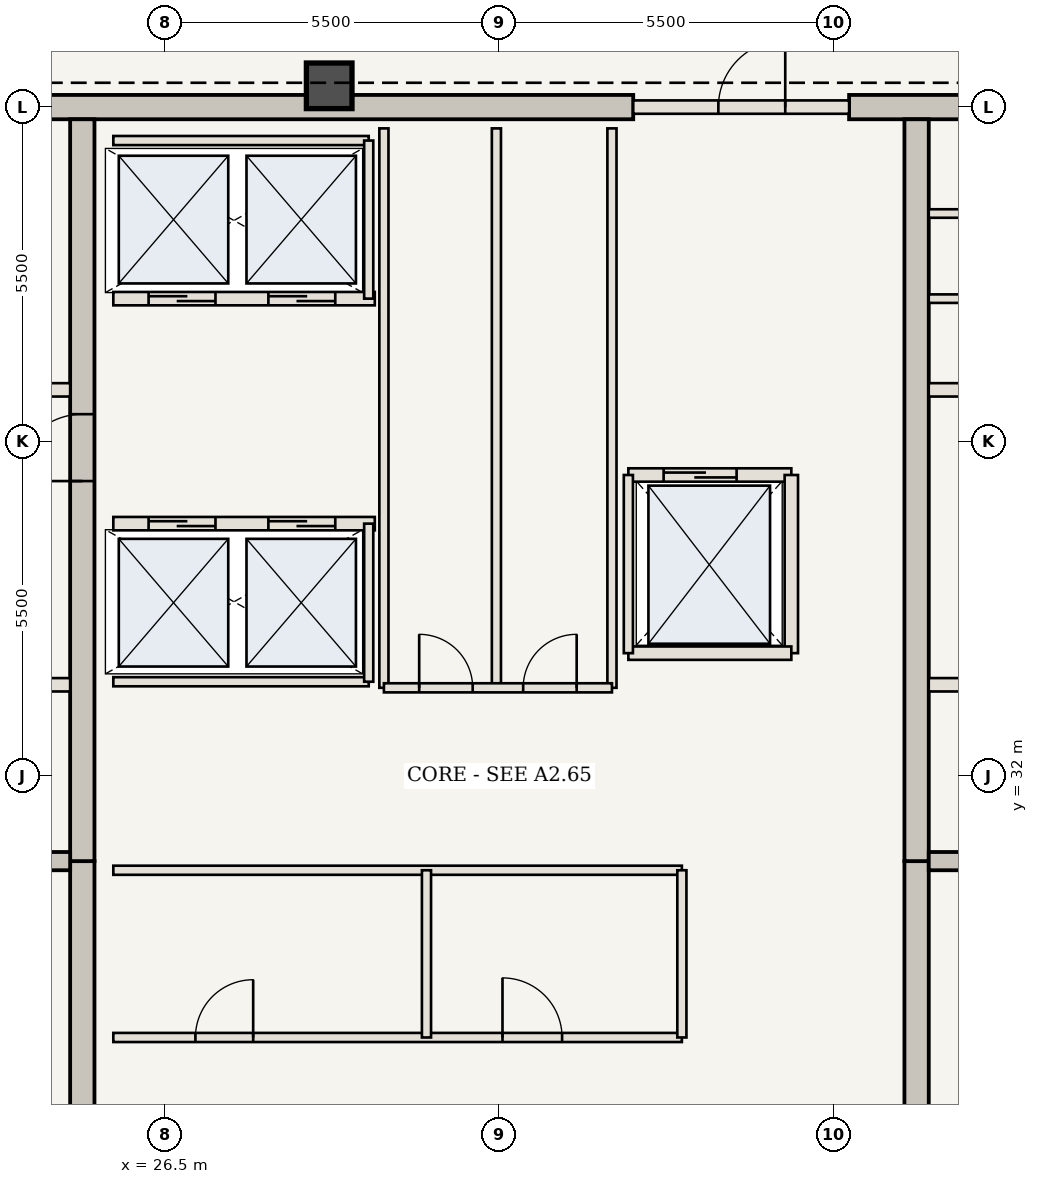
"""IFC4 building model, lengths in metres.
Left out: names, types, materials, properties, quantities, classifications, styles, units other than length and angle.
Written with IfcOpenShell. Run it as: python <this file> out.ifc"""

import sys

from ifc_helpers import new_model, si_unit, direction, frame, frame_2d, origin, origin_2d, place, context, subcontext, project, spatial, rectangle, extrude, element, fill, save


model = new_model("IFC4")
c1 = context("Model", 3, precision=1e-05, world=origin(), true_north=direction((0.0, 1.0)))
c2 = subcontext(c1, "Body", "Model", "MODEL_VIEW")
j1 = project(units=[si_unit("LENGTHUNIT", "METRE"), si_unit("PLANEANGLEUNIT", "RADIAN")], contexts=[c1])
p1 = place(None, origin())
s1 = spatial("IfcSite", under=j1, at=p1, CompositionType="ELEMENT")
p2 = place(p1, origin())
s2 = spatial("IfcBuilding", under=s1, at=p2, CompositionType="ELEMENT")
p3 = place(p2, frame((0.0, 0.0, 304.5)))
s3 = spatial("IfcBuildingStorey", under=s2, at=p3, CompositionType="ELEMENT", Elevation=304.5)
p4 = place(p3, frame((21.41, 43.0, 0.0), z_axis=(0.0, 0.0, 1.0), x_axis=(1.0, 0.0, 0.0)))
e1 = element("IfcWall", 1, at=p4, inside=s3, PredefinedType="SHEAR", context=c2, shape_type="SweptSolid", body=[
    extrude(rectangle(XDim=12.79, YDim=0.4, at=frame_2d((6.395, 0.0))), origin(), (0.0, 0.0, 1.0), 3.85),
])
p5 = place(p3, frame((37.75, 43.0, 0.0), z_axis=(0.0, 0.0, 1.0), x_axis=(1.0, 0.0, 0.0)))
e2 = element("IfcWall", 2, at=p5, inside=s3, PredefinedType="SHEAR", context=c2, shape_type="SweptSolid", body=[
    extrude(rectangle(XDim=4.84, YDim=0.4, at=frame_2d((2.42, 0.0))), origin(), (0.0, 0.0, 1.0), 3.85),
])
p6 = place(p3, frame((25.14, 21.15, 0.0), z_axis=(0.0, 0.0, 1.0), x_axis=(0.0, 1.0, 0.0)))
e3 = element("IfcWall", 3, at=p6, inside=s3, PredefinedType="SHEAR", context=c2, shape_type="SweptSolid", body=[
    extrude(rectangle(XDim=9.45, YDim=0.4, at=frame_2d((4.725, 0.0))), origin(), (0.0, 0.0, 1.0), 3.85),
])
p7 = place(p3, frame((25.14, 30.6, 0.0), z_axis=(0.0, 0.0, 1.0), x_axis=(0.0, 1.0, 0.0)))
e4 = element("IfcWall", 4, at=p7, inside=s3, PredefinedType="SHEAR", context=c2, shape_type="SweptSolid", body=[
    extrude(rectangle(XDim=12.2, YDim=0.4, at=frame_2d((6.1, 0.0))), origin(), (0.0, 0.0, 1.0), 3.85),
])
p8 = place(p7, frame((6.25, 0.0, 0.0)))
e5 = element("IfcOpeningElement", 5, at=p8, cuts=e4, PredefinedType="OPENING", context=c2, shape_type="SweptSolid", body=[
    extrude(rectangle(XDim=1.1, YDim=2.15, at=frame_2d((0.55, 1.075))), frame((0.0, 0.21, 0.0), z_axis=(0.0, -1.0, 0.0), x_axis=(1.0, 0.0, 0.0)), (0.0, 0.0, 1.0), 0.42),
])
p9 = place(p3, frame((38.86, 21.15, 0.0), z_axis=(0.0, 0.0, 1.0), x_axis=(0.0, 1.0, 0.0)))
e6 = element("IfcWall", 6, at=p9, inside=s3, PredefinedType="SHEAR", context=c2, shape_type="SweptSolid", body=[
    extrude(rectangle(XDim=9.45, YDim=0.4, at=frame_2d((4.725, 0.0))), origin(), (0.0, 0.0, 1.0), 3.85),
])
p10 = place(p3, frame((38.86, 30.6, 0.0), z_axis=(0.0, 0.0, 1.0), x_axis=(0.0, 1.0, 0.0)))
e7 = element("IfcWall", 7, at=p10, inside=s3, PredefinedType="SHEAR", context=c2, shape_type="SweptSolid", body=[
    extrude(rectangle(XDim=12.2, YDim=0.4, at=frame_2d((6.1, 0.0))), origin(), (0.0, 0.0, 1.0), 3.85),
])
p11 = place(p3, frame((29.2, 43.35, 0.0), z_axis=(0.0, 0.0, 1.0), x_axis=(1.0, 0.0, 0.0)))
e8 = element("IfcColumn", 8, at=p11, inside=s3, PredefinedType="COLUMN", context=c2, shape_type="SweptSolid", body=[
    extrude(rectangle(XDim=0.75, YDim=0.75, at=origin_2d()), origin(), (0.0, 0.0, 1.0), 3.85),
])
for number, where, z_axis, x_axis in (
    (9, (21.41, 30.6, 0.0), (0.0, 0.0, 1.0), (1.0, 0.0, 0.0)),
    (10, (39.06, 30.6, 0.0), (0.0, 0.0, 1.0), (1.0, 0.0, 0.0)),
):
    element("IfcWall", number, at=place(p3, frame(where, z_axis=z_axis, x_axis=x_axis)), inside=s3, PredefinedType="SHEAR", context=c2, shape_type="SweptSolid", body=[
        extrude(rectangle(XDim=3.53, YDim=0.3, at=frame_2d((1.765, 0.0))), origin(), (0.0, 0.0, 1.0), 3.63),
    ])
p12 = place(p3, frame((21.41, 33.5, 0.0), z_axis=(0.0, 0.0, 1.0), x_axis=(1.0, 0.0, 0.0)))
e11 = element("IfcWall", 11, at=p12, inside=s3, PredefinedType="STANDARD", context=c2, shape_type="SweptSolid", body=[
    extrude(rectangle(XDim=3.53, YDim=0.22, at=frame_2d((1.765, 0.0))), origin(), (0.0, 0.0, 1.0), 3.63),
])
p13 = place(p12, frame((0.75, 0.0, 0.0)))
e12 = element("IfcOpeningElement", 12, at=p13, cuts=e11, PredefinedType="OPENING", context=c2, shape_type="SweptSolid", body=[
    extrude(rectangle(XDim=1.2, YDim=2.2, at=frame_2d((0.6, 1.1))), frame((0.0, 0.12, 0.0), z_axis=(0.0, -1.0, 0.0), x_axis=(1.0, 0.0, 0.0)), (0.0, 0.0, 1.0), 0.24),
])
p14 = place(p3, frame((39.06, 33.5, 0.0), z_axis=(0.0, 0.0, 1.0), x_axis=(1.0, 0.0, 0.0)))
e13 = element("IfcWall", 13, at=p14, inside=s3, PredefinedType="STANDARD", context=c2, shape_type="SweptSolid", body=[
    extrude(rectangle(XDim=3.53, YDim=0.22, at=frame_2d((1.765, 0.0))), origin(), (0.0, 0.0, 1.0), 3.63),
])
p15 = place(p14, frame((1.55, 0.0, 0.0)))
e14 = element("IfcOpeningElement", 14, at=p15, cuts=e13, PredefinedType="OPENING", context=c2, shape_type="SweptSolid", body=[
    extrude(rectangle(XDim=1.2, YDim=2.2, at=frame_2d((0.6, 1.1))), frame((0.0, 0.12, 0.0), z_axis=(0.0, -1.0, 0.0), x_axis=(1.0, 0.0, 0.0)), (0.0, 0.0, 1.0), 0.24),
])
for number, where, z_axis, x_axis in (
    (15, (21.41, 38.35, 0.0), (0.0, 0.0, 1.0), (1.0, 0.0, 0.0)),
    (16, (39.06, 38.35, 0.0), (0.0, 0.0, 1.0), (1.0, 0.0, 0.0)),
):
    element("IfcWall", number, at=place(p3, frame(where, z_axis=z_axis, x_axis=x_axis)), inside=s3, PredefinedType="STANDARD", context=c2, shape_type="SweptSolid", body=[
        extrude(rectangle(XDim=3.53, YDim=0.22, at=frame_2d((1.765, 0.0))), origin(), (0.0, 0.0, 1.0), 3.63),
    ])
for number, where, z_axis, x_axis in (
    (17, (39.06, 39.85, 0.0), (0.0, 0.0, 1.0), (1.0, 0.0, 0.0)),
    (18, (39.06, 41.25, 0.0), (0.0, 0.0, 1.0), (1.0, 0.0, 0.0)),
):
    element("IfcWall", number, at=place(p3, frame(where, z_axis=z_axis, x_axis=x_axis)), inside=s3, PredefinedType="STANDARD", context=c2, shape_type="SweptSolid", body=[
        extrude(rectangle(XDim=3.53, YDim=0.14, at=frame_2d((1.765, 0.0))), origin(), (0.0, 0.0, 1.0), 3.63),
    ])
p16 = place(p3, frame((25.65, 27.7, 0.0), z_axis=(0.0, 0.0, 1.0), x_axis=(1.0, 0.0, 0.0)))
e19 = element("IfcWall", 19, at=p16, inside=s3, PredefinedType="STANDARD", context=c2, shape_type="SweptSolid", body=[
    extrude(rectangle(XDim=9.35, YDim=0.15, at=frame_2d((4.675, 0.0))), origin(), (0.0, 0.0, 1.0), 3.63),
])
p17 = place(p16, frame((1.35, 0.0, 0.0)))
e20 = element("IfcOpeningElement", 20, at=p17, cuts=e19, PredefinedType="OPENING", context=c2, shape_type="SweptSolid", body=[
    extrude(rectangle(XDim=0.95, YDim=2.15, at=frame_2d((0.475, 1.075))), frame((0.0, 0.085, 0.0), z_axis=(0.0, -1.0, 0.0), x_axis=(1.0, 0.0, 0.0)), (0.0, 0.0, 1.0), 0.17),
])
p18 = place(p16, frame((6.4, 0.0, 0.0)))
e21 = element("IfcOpeningElement", 21, at=p18, cuts=e19, PredefinedType="OPENING", context=c2, shape_type="SweptSolid", body=[
    extrude(rectangle(XDim=0.98, YDim=2.2, at=frame_2d((0.49, 1.1))), frame((0.0, 0.085, 0.0), z_axis=(0.0, -1.0, 0.0), x_axis=(1.0, 0.0, 0.0)), (0.0, 0.0, 1.0), 0.17),
])
p19 = place(p3, frame((25.65, 30.45, 0.0), z_axis=(0.0, 0.0, 1.0), x_axis=(1.0, 0.0, 0.0)))
e22 = element("IfcWall", 22, at=p19, inside=s3, PredefinedType="STANDARD", context=c2, shape_type="SweptSolid", body=[
    extrude(rectangle(XDim=9.35, YDim=0.15, at=frame_2d((4.675, 0.0))), origin(), (0.0, 0.0, 1.0), 3.63),
])
for number, where, z_axis, x_axis in (
    (23, (30.8, 27.7, 0.0), (0.0, 0.0, 1.0), (0.0, 1.0, 0.0)),
    (24, (35.0, 27.7, 0.0), (0.0, 0.0, 1.0), (0.0, 1.0, 0.0)),
):
    element("IfcWall", number, at=place(p3, frame(where, z_axis=z_axis, x_axis=x_axis)), inside=s3, PredefinedType="STANDARD", context=c2, shape_type="SweptSolid", body=[
        extrude(rectangle(XDim=2.75, YDim=0.15, at=frame_2d((1.375, 0.0))), origin(), (0.0, 0.0, 1.0), 3.63),
    ])
p20 = place(p3, frame((25.65, 36.15, 0.0), z_axis=(0.0, 0.0, 1.0), x_axis=(1.0, 0.0, 0.0)))
e25 = element("IfcWall", 25, at=p20, inside=s3, PredefinedType="STANDARD", context=c2, shape_type="SweptSolid", body=[
    extrude(rectangle(XDim=4.3, YDim=0.22, at=frame_2d((2.15, 0.0))), origin(), (0.0, 0.0, 1.0), 3.63),
])
p21 = place(p20, frame((0.58, 0.0, 0.0)))
e26 = element("IfcOpeningElement", 26, at=p21, cuts=e25, PredefinedType="OPENING", context=c2, shape_type="SweptSolid", body=[
    extrude(rectangle(XDim=1.1, YDim=2.15, at=frame_2d((0.55, 1.075))), frame((0.0, 0.12, 0.0), z_axis=(0.0, -1.0, 0.0), x_axis=(1.0, 0.0, 0.0)), (0.0, 0.0, 1.0), 0.24),
])
p22 = place(p20, frame((2.55, 0.0, 0.0)))
e27 = element("IfcOpeningElement", 27, at=p22, cuts=e25, PredefinedType="OPENING", context=c2, shape_type="SweptSolid", body=[
    extrude(rectangle(XDim=1.1, YDim=2.15, at=frame_2d((0.55, 1.075))), frame((0.0, 0.12, 0.0), z_axis=(0.0, -1.0, 0.0), x_axis=(1.0, 0.0, 0.0)), (0.0, 0.0, 1.0), 0.24),
])
p23 = place(p3, frame((25.65, 33.55, 0.0), z_axis=(0.0, 0.0, 1.0), x_axis=(1.0, 0.0, 0.0)))
e28 = element("IfcWall", 28, at=p23, inside=s3, PredefinedType="STANDARD", context=c2, shape_type="SweptSolid", body=[
    extrude(rectangle(XDim=4.2, YDim=0.15, at=frame_2d((2.1, 0.0))), origin(), (0.0, 0.0, 1.0), 3.63),
])
p24 = place(p3, frame((29.85, 33.55, 0.0), z_axis=(0.0, 0.0, 1.0), x_axis=(0.0, 1.0, 0.0)))
e29 = element("IfcWall", 29, at=p24, inside=s3, PredefinedType="STANDARD", context=c2, shape_type="SweptSolid", body=[
    extrude(rectangle(XDim=2.6, YDim=0.15, at=frame_2d((1.3, 0.0))), origin(), (0.0, 0.0, 1.0), 3.63),
])
p25 = place(p3, frame((25.65, 39.85, 0.0), z_axis=(0.0, 0.0, 1.0), x_axis=(1.0, 0.0, 0.0)))
e30 = element("IfcWall", 30, at=p25, inside=s3, PredefinedType="STANDARD", context=c2, shape_type="SweptSolid", body=[
    extrude(rectangle(XDim=4.3, YDim=0.22, at=frame_2d((2.15, 0.0))), origin(), (0.0, 0.0, 1.0), 3.63),
])
p26 = place(p25, frame((0.58, 0.0, 0.0)))
e31 = element("IfcOpeningElement", 31, at=p26, cuts=e30, PredefinedType="OPENING", context=c2, shape_type="SweptSolid", body=[
    extrude(rectangle(XDim=1.1, YDim=2.15, at=frame_2d((0.55, 1.075))), frame((0.0, 0.12, 0.0), z_axis=(0.0, -1.0, 0.0), x_axis=(1.0, 0.0, 0.0)), (0.0, 0.0, 1.0), 0.24),
])
p27 = place(p25, frame((2.55, 0.0, 0.0)))
e32 = element("IfcOpeningElement", 32, at=p27, cuts=e30, PredefinedType="OPENING", context=c2, shape_type="SweptSolid", body=[
    extrude(rectangle(XDim=1.1, YDim=2.15, at=frame_2d((0.55, 1.075))), frame((0.0, 0.12, 0.0), z_axis=(0.0, -1.0, 0.0), x_axis=(1.0, 0.0, 0.0)), (0.0, 0.0, 1.0), 0.24),
])
p28 = place(p3, frame((25.65, 42.45, 0.0), z_axis=(0.0, 0.0, 1.0), x_axis=(1.0, 0.0, 0.0)))
e33 = element("IfcWall", 33, at=p28, inside=s3, PredefinedType="STANDARD", context=c2, shape_type="SweptSolid", body=[
    extrude(rectangle(XDim=4.2, YDim=0.15, at=frame_2d((2.1, 0.0))), origin(), (0.0, 0.0, 1.0), 3.63),
])
p29 = place(p3, frame((29.85, 39.85, 0.0), z_axis=(0.0, 0.0, 1.0), x_axis=(0.0, 1.0, 0.0)))
e34 = element("IfcWall", 34, at=p29, inside=s3, PredefinedType="STANDARD", context=c2, shape_type="SweptSolid", body=[
    extrude(rectangle(XDim=2.6, YDim=0.15, at=frame_2d((1.3, 0.0))), origin(), (0.0, 0.0, 1.0), 3.63),
])
for number, where, z_axis, x_axis in (
    (35, (30.1, 33.45, 0.0), (0.0, 0.0, 1.0), (0.0, 1.0, 0.0)),
    (36, (31.95, 33.45, 0.0), (0.0, 0.0, 1.0), (0.0, 1.0, 0.0)),
    (37, (33.85, 33.45, 0.0), (0.0, 0.0, 1.0), (0.0, 1.0, 0.0)),
):
    element("IfcWall", number, at=place(p3, frame(where, z_axis=z_axis, x_axis=x_axis)), inside=s3, PredefinedType="STANDARD", context=c2, shape_type="SweptSolid", body=[
        extrude(rectangle(XDim=9.2, YDim=0.15, at=frame_2d((4.6, 0.0))), origin(), (0.0, 0.0, 1.0), 3.63),
    ])
p30 = place(p3, frame((30.1, 33.45, 0.0), z_axis=(0.0, 0.0, 1.0), x_axis=(1.0, 0.0, 0.0)))
e38 = element("IfcWall", 38, at=p30, inside=s3, PredefinedType="STANDARD", context=c2, shape_type="SweptSolid", body=[
    extrude(rectangle(XDim=3.75, YDim=0.15, at=frame_2d((1.875, 0.0))), origin(), (0.0, 0.0, 1.0), 3.63),
])
p31 = place(p30, frame((0.58, 0.0, 0.0)))
e39 = element("IfcOpeningElement", 39, at=p31, cuts=e38, PredefinedType="OPENING", context=c2, shape_type="SweptSolid", body=[
    extrude(rectangle(XDim=0.88, YDim=2.1, at=frame_2d((0.44, 1.05))), frame((0.0, 0.085, 0.0), z_axis=(0.0, -1.0, 0.0), x_axis=(1.0, 0.0, 0.0)), (0.0, 0.0, 1.0), 0.17),
])
p32 = place(p30, frame((2.29, 0.0, 0.0)))
e40 = element("IfcOpeningElement", 40, at=p32, cuts=e38, PredefinedType="OPENING", context=c2, shape_type="SweptSolid", body=[
    extrude(rectangle(XDim=0.88, YDim=2.1, at=frame_2d((0.44, 1.05))), frame((0.0, 0.085, 0.0), z_axis=(0.0, -1.0, 0.0), x_axis=(1.0, 0.0, 0.0)), (0.0, 0.0, 1.0), 0.17),
])
p33 = place(p3, frame((34.2, 43.0, 0.0), z_axis=(0.0, 0.0, 1.0), x_axis=(1.0, 0.0, 0.0)))
e41 = element("IfcWall", 41, at=p33, inside=s3, PredefinedType="STANDARD", context=c2, shape_type="SweptSolid", body=[
    extrude(rectangle(XDim=3.55, YDim=0.22, at=frame_2d((1.775, 0.0))), origin(), (0.0, 0.0, 1.0), 3.63),
])
p34 = place(p33, frame((1.4, 0.0, 0.0)))
e42 = element("IfcOpeningElement", 42, at=p34, cuts=e41, PredefinedType="OPENING", context=c2, shape_type="SweptSolid", body=[
    extrude(rectangle(XDim=1.1, YDim=2.15, at=frame_2d((0.55, 1.075))), frame((0.0, 0.12, 0.0), z_axis=(0.0, -1.0, 0.0), x_axis=(1.0, 0.0, 0.0)), (0.0, 0.0, 1.0), 0.24),
])
p35 = place(p3, frame((34.12, 36.95, 0.0), z_axis=(0.0, 0.0, 1.0), x_axis=(1.0, 0.0, 0.0)))
e43 = element("IfcWall", 43, at=p35, inside=s3, PredefinedType="STANDARD", context=c2, shape_type="SweptSolid", body=[
    extrude(rectangle(XDim=2.68, YDim=0.22, at=frame_2d((1.34, 0.0))), origin(), (0.0, 0.0, 1.0), 3.63),
])
p36 = place(p35, frame((0.58, 0.0, 0.0)))
e44 = element("IfcOpeningElement", 44, at=p36, cuts=e43, PredefinedType="OPENING", context=c2, shape_type="SweptSolid", body=[
    extrude(rectangle(XDim=1.2, YDim=2.2, at=frame_2d((0.6, 1.1))), frame((0.0, 0.12, 0.0), z_axis=(0.0, -1.0, 0.0), x_axis=(1.0, 0.0, 0.0)), (0.0, 0.0, 1.0), 0.24),
])
p37 = place(p3, frame((36.8, 34.02, 0.0), z_axis=(0.0, 0.0, 1.0), x_axis=(0.0, 1.0, 0.0)))
e45 = element("IfcWall", 45, at=p37, inside=s3, PredefinedType="STANDARD", context=c2, shape_type="SweptSolid", body=[
    extrude(rectangle(XDim=2.93, YDim=0.22, at=frame_2d((1.465, 0.0))), origin(), (0.0, 0.0, 1.0), 3.63),
])
p38 = place(p3, frame((34.12, 34.02, 0.0), z_axis=(0.0, 0.0, 1.0), x_axis=(1.0, 0.0, 0.0)))
e46 = element("IfcWall", 46, at=p38, inside=s3, PredefinedType="STANDARD", context=c2, shape_type="SweptSolid", body=[
    extrude(rectangle(XDim=2.68, YDim=0.22, at=frame_2d((1.34, 0.0))), origin(), (0.0, 0.0, 1.0), 3.63),
])
p39 = place(p3, frame((34.12, 34.02, 0.0), z_axis=(0.0, 0.0, 1.0), x_axis=(0.0, 1.0, 0.0)))
e47 = element("IfcWall", 47, at=p39, inside=s3, PredefinedType="STANDARD", context=c2, shape_type="SweptSolid", body=[
    extrude(rectangle(XDim=2.93, YDim=0.15, at=frame_2d((1.465, 0.0))), origin(), (0.0, 0.0, 1.0), 3.63),
])
p40 = place(p8, origin())
e48 = element("IfcDoor", 48, at=p40, inside=s3, OperationType="SINGLE_SWING_LEFT", PredefinedType="DOOR", context=c2, shape_type="SweptSolid", body=[
    extrude(rectangle(XDim=1.1, YDim=2.15, at=frame_2d((0.55, 1.075))), frame((0.0, 0.025, 0.0), z_axis=(0.0, -1.0, 0.0), x_axis=(1.0, 0.0, 0.0)), (0.0, 0.0, 1.0), 0.05),
])
fill(e5, e48)
p41 = place(p17, origin())
e49 = element("IfcDoor", 49, at=p41, inside=s3, OperationType="SINGLE_SWING_RIGHT", PredefinedType="DOOR", context=c2, shape_type="SweptSolid", body=[
    extrude(rectangle(XDim=0.95, YDim=2.15, at=frame_2d((0.475, 1.075))), frame((0.0, 0.025, 0.0), z_axis=(0.0, -1.0, 0.0), x_axis=(1.0, 0.0, 0.0)), (0.0, 0.0, 1.0), 0.05),
])
fill(e20, e49)
p42 = place(p18, origin())
e50 = element("IfcDoor", 50, at=p42, inside=s3, OperationType="SINGLE_SWING_LEFT", PredefinedType="DOOR", context=c2, shape_type="SweptSolid", body=[
    extrude(rectangle(XDim=0.98, YDim=2.2, at=frame_2d((0.49, 1.1))), frame((0.0, 0.025, 0.0), z_axis=(0.0, -1.0, 0.0), x_axis=(1.0, 0.0, 0.0)), (0.0, 0.0, 1.0), 0.05),
])
fill(e21, e50)
p43 = place(p21, origin())
e51 = element("IfcDoor", 51, at=p43, inside=s3, OperationType="DOUBLE_DOOR_SLIDING", PredefinedType="DOOR", context=c2, shape_type="SweptSolid", body=[
    extrude(rectangle(XDim=1.1, YDim=2.15, at=frame_2d((0.55, 1.075))), frame((0.0, 0.025, 0.0), z_axis=(0.0, -1.0, 0.0), x_axis=(1.0, 0.0, 0.0)), (0.0, 0.0, 1.0), 0.05),
])
fill(e26, e51)
p44 = place(p22, origin())
e52 = element("IfcDoor", 52, at=p44, inside=s3, OperationType="DOUBLE_DOOR_SLIDING", PredefinedType="DOOR", context=c2, shape_type="SweptSolid", body=[
    extrude(rectangle(XDim=1.1, YDim=2.15, at=frame_2d((0.55, 1.075))), frame((0.0, 0.025, 0.0), z_axis=(0.0, -1.0, 0.0), x_axis=(1.0, 0.0, 0.0)), (0.0, 0.0, 1.0), 0.05),
])
fill(e27, e52)
p45 = place(p26, origin())
e53 = element("IfcDoor", 53, at=p45, inside=s3, OperationType="DOUBLE_DOOR_SLIDING", PredefinedType="DOOR", context=c2, shape_type="SweptSolid", body=[
    extrude(rectangle(XDim=1.1, YDim=2.15, at=frame_2d((0.55, 1.075))), frame((0.0, 0.025, 0.0), z_axis=(0.0, -1.0, 0.0), x_axis=(1.0, 0.0, 0.0)), (0.0, 0.0, 1.0), 0.05),
])
fill(e31, e53)
p46 = place(p27, origin())
e54 = element("IfcDoor", 54, at=p46, inside=s3, OperationType="DOUBLE_DOOR_SLIDING", PredefinedType="DOOR", context=c2, shape_type="SweptSolid", body=[
    extrude(rectangle(XDim=1.1, YDim=2.15, at=frame_2d((0.55, 1.075))), frame((0.0, 0.025, 0.0), z_axis=(0.0, -1.0, 0.0), x_axis=(1.0, 0.0, 0.0)), (0.0, 0.0, 1.0), 0.05),
])
fill(e32, e54)
p47 = place(p31, origin())
e55 = element("IfcDoor", 55, at=p47, inside=s3, OperationType="SINGLE_SWING_LEFT", PredefinedType="DOOR", context=c2, shape_type="SweptSolid", body=[
    extrude(rectangle(XDim=0.88, YDim=2.1, at=frame_2d((0.44, 1.05))), frame((0.0, 0.025, 0.0), z_axis=(0.0, -1.0, 0.0), x_axis=(1.0, 0.0, 0.0)), (0.0, 0.0, 1.0), 0.05),
])
fill(e39, e55)
p48 = place(p32, origin())
e56 = element("IfcDoor", 56, at=p48, inside=s3, OperationType="SINGLE_SWING_RIGHT", PredefinedType="DOOR", context=c2, shape_type="SweptSolid", body=[
    extrude(rectangle(XDim=0.88, YDim=2.1, at=frame_2d((0.44, 1.05))), frame((0.0, 0.025, 0.0), z_axis=(0.0, -1.0, 0.0), x_axis=(1.0, 0.0, 0.0)), (0.0, 0.0, 1.0), 0.05),
])
fill(e40, e56)
p49 = place(p34, origin())
e57 = element("IfcDoor", 57, at=p49, inside=s3, OperationType="SINGLE_SWING_RIGHT", PredefinedType="DOOR", context=c2, shape_type="SweptSolid", body=[
    extrude(rectangle(XDim=1.1, YDim=2.15, at=frame_2d((0.55, 1.075))), frame((0.0, 0.025, 0.0), z_axis=(0.0, -1.0, 0.0), x_axis=(1.0, 0.0, 0.0)), (0.0, 0.0, 1.0), 0.05),
])
fill(e42, e57)
p50 = place(p36, origin())
e58 = element("IfcDoor", 58, at=p50, inside=s3, OperationType="DOUBLE_DOOR_SLIDING", PredefinedType="DOOR", context=c2, shape_type="SweptSolid", body=[
    extrude(rectangle(XDim=1.2, YDim=2.2, at=frame_2d((0.6, 1.1))), frame((0.0, 0.025, 0.0), z_axis=(0.0, -1.0, 0.0), x_axis=(1.0, 0.0, 0.0)), (0.0, 0.0, 1.0), 0.05),
])
fill(e44, e58)
save(model, sys.argv[1])
